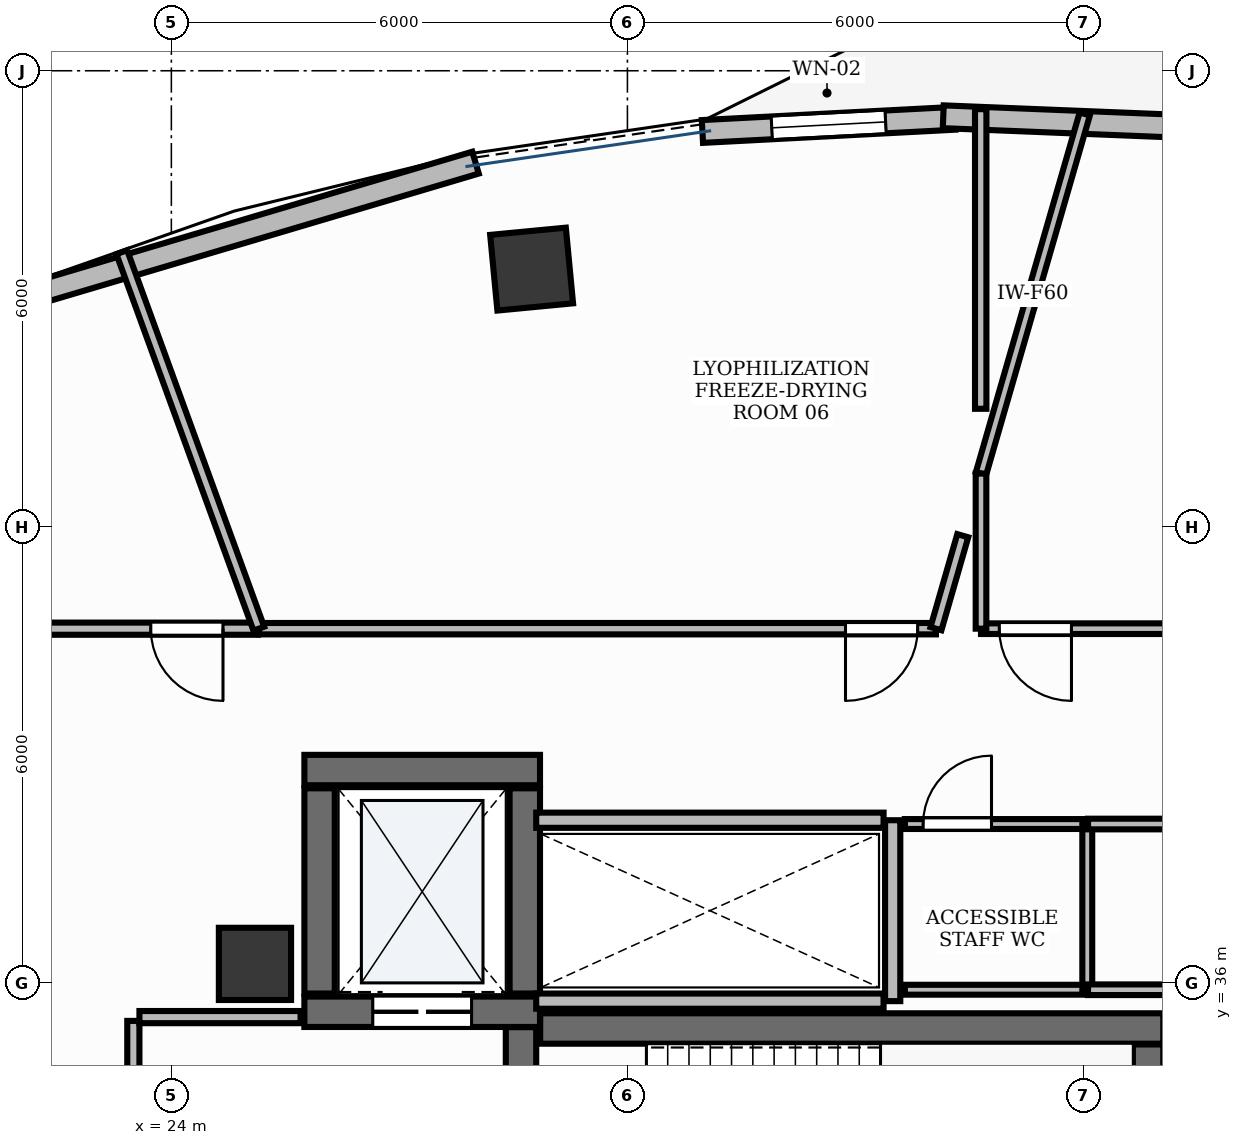
"""IFC4 building model, lengths in metres.
Left out: names, types, materials, properties, quantities, classifications, styles, units other than length and angle.
Written with IfcOpenShell. Run it as: python <this file> out.ifc"""

import sys

from ifc_helpers import new_model, si_unit, direction, frame, frame_2d, origin, origin_2d, place, context, subcontext, project, spatial, rectangle, extrude, element, fill, save


model = new_model("IFC4")
c1 = context("Model", 3, precision=1e-05, world=origin(), true_north=direction((0.0, 1.0)))
c2 = subcontext(c1, "Body", "Model", "MODEL_VIEW")
j1 = project(units=[si_unit("LENGTHUNIT", "METRE"), si_unit("PLANEANGLEUNIT", "RADIAN")], contexts=[c1])
p1 = place(None, origin())
s1 = spatial("IfcSite", under=j1, at=p1, CompositionType="ELEMENT")
p2 = place(p1, origin())
s2 = spatial("IfcBuilding", under=s1, at=p2, CompositionType="ELEMENT")
p3 = place(p2, frame((0.0, 0.0, 166.8)))
s3 = spatial("IfcBuildingStorey", under=s2, at=p3, CompositionType="ELEMENT", Elevation=166.8)
p4 = place(p3, frame((28.852, 35.4, 0.0), z_axis=(0.0, 0.0, 1.0), x_axis=(1.0, 0.0, 0.0)))
e1 = element("IfcWall", 1, at=p4, inside=s3, PredefinedType="SHEAR", context=c2, shape_type="SweptSolid", body=[
    extrude(rectangle(XDim=8.198, YDim=0.4, at=frame_2d((4.099, 0.0))), origin(), (0.0, 0.0, 1.0), 3.9),
])
p5 = place(p3, frame((36.85, 32.11, 0.0), z_axis=(0.0, 0.0, 1.0), x_axis=(0.0, 1.0, 0.0)))
e2 = element("IfcWall", 2, at=p5, inside=s3, PredefinedType="SHEAR", context=c2, shape_type="SweptSolid", body=[
    extrude(rectangle(XDim=3.08, YDim=0.4, at=frame_2d((1.54, 0.0))), origin(), (0.0, 0.0, 1.0), 3.9),
])
p6 = place(p3, frame((28.6, 32.11, 0.0), z_axis=(0.0, 0.0, 1.0), x_axis=(0.0, 1.0, 0.0)))
e3 = element("IfcWall", 3, at=p6, inside=s3, PredefinedType="SHEAR", context=c2, shape_type="SweptSolid", body=[
    extrude(rectangle(XDim=3.308, YDim=0.4, at=frame_2d((1.654, 0.0))), origin(), (0.0, 0.0, 1.0), 3.9),
])
p7 = place(p6, frame((0.2, 0.0, 0.0)))
e4 = element("IfcOpeningElement", 4, at=p7, cuts=e3, PredefinedType="OPENING", context=c2, shape_type="SweptSolid", body=[
    extrude(rectangle(XDim=1.05, YDim=2.15, at=frame_2d((0.525, 1.075))), frame((0.0, 0.215, 0.0), z_axis=(0.0, -1.0, 0.0), x_axis=(1.0, 0.0, 0.0)), (0.0, 0.0, 1.0), 0.43),
])
p8 = place(p3, frame((25.75, 38.8, 0.0), z_axis=(0.0, 0.0, 1.0), x_axis=(1.0, 0.0, 0.0)))
e5 = element("IfcWall", 5, at=p8, inside=s3, PredefinedType="SHEAR", context=c2, shape_type="SweptSolid", body=[
    extrude(rectangle(XDim=3.1, YDim=0.4, at=frame_2d((1.55, 0.0))), origin(), (0.0, 0.0, 1.0), 3.9),
])
p9 = place(p3, frame((25.75, 35.62, 0.0), z_axis=(0.0, 0.0, 1.0), x_axis=(1.0, 0.0, 0.0)))
e6 = element("IfcWall", 6, at=p9, inside=s3, PredefinedType="SHEAR", context=c2, shape_type="SweptSolid", body=[
    extrude(rectangle(XDim=3.1, YDim=0.4, at=frame_2d((1.55, 0.0))), origin(), (0.0, 0.0, 1.0), 3.9),
])
p10 = place(p9, frame((0.9, 0.0, 0.0)))
e7 = element("IfcOpeningElement", 7, at=p10, cuts=e6, PredefinedType="OPENING", context=c2, shape_type="SweptSolid", body=[
    extrude(rectangle(XDim=1.3, YDim=2.2, at=frame_2d((0.65, 1.1))), frame((0.0, 0.215, 0.0), z_axis=(0.0, -1.0, 0.0), x_axis=(1.0, 0.0, 0.0)), (0.0, 0.0, 1.0), 0.43),
])
for number, where, z_axis, x_axis in (
    (8, (25.95, 35.86, 0.0), (0.0, 0.0, 1.0), (0.0, 1.0, 0.0)),
    (9, (28.65, 35.86, 0.0), (0.0, 0.0, 1.0), (0.0, 1.0, 0.0)),
):
    element("IfcWall", number, at=place(p3, frame(where, z_axis=z_axis, x_axis=x_axis)), inside=s3, PredefinedType="SHEAR", context=c2, shape_type="SweptSolid", body=[
        extrude(rectangle(XDim=2.7, YDim=0.4, at=frame_2d((1.35, 0.0))), origin(), (0.0, 0.0, 1.0), 3.9),
    ])
p11 = place(p3, frame((25.1, 36.25, -0.0), z_axis=(0.0, 0.0, 1.0), x_axis=(1.0, 0.0, 0.0)))
e10 = element("IfcColumn", 10, at=p11, inside=s3, PredefinedType="PILASTER", context=c2, shape_type="SweptSolid", body=[
    extrude(rectangle(XDim=0.95, YDim=0.95, at=origin_2d()), origin(), (0.0, 0.0, 1.0), 3.901),
])
p12 = place(p3, frame((28.74, 45.39, -0.0), z_axis=(0.0, 0.0, 1.0), x_axis=(0.995462868748, 0.095150811579, 0.0)))
e11 = element("IfcColumn", 11, at=p12, inside=s3, PredefinedType="COLUMN", context=c2, shape_type="SweptSolid", body=[
    extrude(rectangle(XDim=1.0, YDim=1.0, at=origin_2d()), origin(), (0.0, 0.0, 1.0), 3.901),
])
p13 = place(p3, frame((34.309, 47.375, 0.0), z_axis=(0.0, 0.0, 1.0), x_axis=(-0.998637826203, -0.05217750547, 0.0)))
e12 = element("IfcWall", 12, at=p13, inside=s3, PredefinedType="STANDARD", context=c2, shape_type="SweptSolid", body=[
    extrude(rectangle(XDim=3.327, YDim=0.3, at=frame_2d((1.664, 0.0))), origin(), (0.0, 0.0, 1.0), 3.9),
])
p14 = place(p13, frame((0.913, 0.0, 0.95)))
e13 = element("IfcOpeningElement", 13, at=p14, cuts=e12, PredefinedType="OPENING", context=c2, shape_type="SweptSolid", body=[
    extrude(rectangle(XDim=1.5, YDim=1.8, at=frame_2d((0.75, 0.9))), frame((0.0, 0.165, 0.0), z_axis=(0.0, -1.0, 0.0), x_axis=(1.0, 0.0, 0.0)), (0.0, 0.0, 1.0), 0.33),
])
p15 = place(p3, frame((37.521, 47.259, 0.0), z_axis=(0.0, 0.0, 1.0), x_axis=(-0.999190386434, 0.040231475948, 0.0)))
e14 = element("IfcWall", 14, at=p15, inside=s3, PredefinedType="STANDARD", context=c2, shape_type="SweptSolid", body=[
    extrude(rectangle(XDim=3.368, YDim=0.3, at=frame_2d((1.684, 0.0))), origin(), (0.0, 0.0, 1.0), 3.9),
])
p16 = place(p3, frame((28.002, 46.791, 0.0), z_axis=(0.0, 0.0, 1.0), x_axis=(-0.958672086524, -0.284513322218, 0.0)))
e15 = element("IfcWall", 15, at=p16, inside=s3, PredefinedType="STANDARD", context=c2, shape_type="SweptSolid", body=[
    extrude(rectangle(XDim=6.396, YDim=0.3, at=frame_2d((3.198, 0.0))), origin(), (0.0, 0.0, 1.0), 3.47),
])
p17 = place(p3, frame((33.49, 35.76, 0.0), z_axis=(0.0, 0.0, 1.0), x_axis=(0.0, 1.0, 0.0)))
e16 = element("IfcWall", 16, at=p17, inside=s3, PredefinedType="PARTITIONING", context=c2, shape_type="SweptSolid", body=[
    extrude(rectangle(XDim=2.38, YDim=0.2, at=frame_2d((1.19, 0.0))), origin(), (0.0, 0.0, 1.0), 2.91),
])
for number, where, z_axis, x_axis in (
    (17, (28.8, 35.76, 0.0), (0.0, 0.0, 1.0), (1.0, 0.0, 0.0)),
    (18, (28.8, 38.14, 0.0), (0.0, 0.0, 1.0), (1.0, 0.0, 0.0)),
):
    element("IfcWall", number, at=place(p3, frame(where, z_axis=z_axis, x_axis=x_axis)), inside=s3, PredefinedType="PARTITIONING", context=c2, shape_type="SweptSolid", body=[
        extrude(rectangle(XDim=4.57, YDim=0.2, at=frame_2d((2.285, 0.0))), origin(), (0.0, 0.0, 1.0), 2.91),
    ])
p18 = place(p3, frame((23.5, 32.1, 0.0), z_axis=(0.0, 0.0, 1.0), x_axis=(0.0, 1.0, 0.0)))
e19 = element("IfcWall", 19, at=p18, inside=s3, PredefinedType="PARTITIONING", context=c2, shape_type="SweptSolid", body=[
    extrude(rectangle(XDim=3.4, YDim=0.16, at=frame_2d((1.7, 0.0))), origin(), (0.0, 0.0, 1.0), 2.91),
])
p19 = place(p18, frame((1.175, 0.0, 0.0)))
e20 = element("IfcOpeningElement", 20, at=p19, cuts=e19, PredefinedType="OPENING", context=c2, shape_type="SweptSolid", body=[
    extrude(rectangle(XDim=1.05, YDim=2.15, at=frame_2d((0.525, 1.075))), frame((0.0, 0.095, 0.0), z_axis=(0.0, -1.0, 0.0), x_axis=(1.0, 0.0, 0.0)), (0.0, 0.0, 1.0), 0.19),
])
p20 = place(p3, frame((23.58, 35.55, 0.0), z_axis=(0.0, 0.0, 1.0), x_axis=(1.0, 0.0, 0.0)))
e21 = element("IfcWall", 21, at=p20, inside=s3, PredefinedType="PARTITIONING", context=c2, shape_type="SweptSolid", body=[
    extrude(rectangle(XDim=2.12, YDim=0.16, at=frame_2d((1.06, 0.0))), origin(), (0.0, 0.0, 1.0), 2.91),
])
p21 = place(p3, frame((33.65, 38.09, 0.0), z_axis=(0.0, 0.0, 1.0), x_axis=(1.0, 0.0, 0.0)))
e22 = element("IfcWall", 22, at=p21, inside=s3, PredefinedType="PARTITIONING", context=c2, shape_type="SweptSolid", body=[
    extrude(rectangle(XDim=2.4, YDim=0.13, at=frame_2d((1.2, 0.0))), origin(), (0.0, 0.0, 1.0), 2.91),
])
p22 = place(p21, frame((0.24, 0.0, 0.0)))
e23 = element("IfcOpeningElement", 23, at=p22, cuts=e22, PredefinedType="OPENING", context=c2, shape_type="SweptSolid", body=[
    extrude(rectangle(XDim=0.9, YDim=2.15, at=frame_2d((0.45, 1.075))), frame((0.0, 0.08, 0.0), z_axis=(0.0, -1.0, 0.0), x_axis=(1.0, 0.0, 0.0)), (0.0, 0.0, 1.0), 0.16),
])
p23 = place(p3, frame((37.2, 40.66, 0.0), z_axis=(0.0, 0.0, 1.0), x_axis=(-1.0, 0.0, 0.0)))
e24 = element("IfcWall", 24, at=p23, inside=s3, PredefinedType="PARTITIONING", context=c2, shape_type="SweptSolid", body=[
    extrude(rectangle(XDim=2.548, YDim=0.14, at=frame_2d((1.274, 0.0))), origin(), (0.0, 0.0, 1.0), 2.91),
])
p24 = place(p23, frame((1.358, 0.0, 0.0)))
e25 = element("IfcOpeningElement", 25, at=p24, cuts=e24, PredefinedType="OPENING", context=c2, shape_type="SweptSolid", body=[
    extrude(rectangle(XDim=0.95, YDim=2.15, at=frame_2d((0.475, 1.075))), frame((0.0, 0.085, 0.0), z_axis=(0.0, -1.0, 0.0), x_axis=(1.0, 0.0, 0.0)), (0.0, 0.0, 1.0), 0.17),
])
p25 = place(p3, frame((34.059, 40.66, 0.0), z_axis=(0.0, 0.0, 1.0), x_axis=(-1.0, 0.0, 0.0)))
e26 = element("IfcWall", 26, at=p25, inside=s3, PredefinedType="PARTITIONING", context=c2, shape_type="SweptSolid", body=[
    extrude(rectangle(XDim=8.908, YDim=0.15, at=frame_2d((4.454, 0.0))), origin(), (0.0, 0.0, 1.0), 2.91),
])
p26 = place(p25, frame((0.24, 0.0, 0.0)))
e27 = element("IfcOpeningElement", 27, at=p26, cuts=e26, PredefinedType="OPENING", context=c2, shape_type="SweptSolid", body=[
    extrude(rectangle(XDim=0.95, YDim=2.15, at=frame_2d((0.475, 1.075))), frame((0.0, 0.09, 0.0), z_axis=(0.0, -1.0, 0.0), x_axis=(1.0, 0.0, 0.0)), (0.0, 0.0, 1.0), 0.18),
])
p27 = place(p3, frame((25.14, 40.66, 0.0), z_axis=(0.0, 0.0, 1.0), x_axis=(-1.0, 0.0, 0.0)))
e28 = element("IfcWall", 28, at=p27, inside=s3, PredefinedType="PARTITIONING", context=c2, shape_type="SweptSolid", body=[
    extrude(rectangle(XDim=3.39, YDim=0.16, at=frame_2d((1.695, 0.0))), origin(), (0.0, 0.0, 1.0), 2.91),
])
p28 = place(p27, frame((0.461, 0.0, 0.0)))
e29 = element("IfcOpeningElement", 29, at=p28, cuts=e28, PredefinedType="OPENING", context=c2, shape_type="SweptSolid", body=[
    extrude(rectangle(XDim=0.95, YDim=2.15, at=frame_2d((0.475, 1.075))), frame((0.0, 0.095, 0.0), z_axis=(0.0, -1.0, 0.0), x_axis=(1.0, 0.0, 0.0)), (0.0, 0.0, 1.0), 0.19),
])
p29 = place(p3, frame((36.05, 35.91, 0.0), z_axis=(0.0, 0.0, 1.0), x_axis=(-1.0, 0.0, 0.0)))
e30 = element("IfcWall", 30, at=p29, inside=s3, PredefinedType="PARTITIONING", context=c2, shape_type="SweptSolid", body=[
    extrude(rectangle(XDim=2.4, YDim=0.13, at=frame_2d((1.2, 0.0))), origin(), (0.0, 0.0, 1.0), 2.91),
])
p30 = place(p3, frame((36.05, 38.09, 0.0), z_axis=(0.0, 0.0, 1.0), x_axis=(0.0, -1.0, 0.0)))
e31 = element("IfcWall", 31, at=p30, inside=s3, PredefinedType="PARTITIONING", context=c2, shape_type="SweptSolid", body=[
    extrude(rectangle(XDim=2.18, YDim=0.13, at=frame_2d((1.09, 0.0))), origin(), (0.0, 0.0, 1.0), 2.91),
])
p31 = place(p3, frame((34.652, 42.701, 0.0), z_axis=(0.0, 0.0, 1.0), x_axis=(0.277202021351, 0.960811656548, 0.0)))
e32 = element("IfcWall", 32, at=p31, inside=s3, PredefinedType="PARTITIONING", context=c2, shape_type="SweptSolid", body=[
    extrude(rectangle(XDim=4.924, YDim=0.14, at=frame_2d((2.462, 0.0))), origin(), (0.0, 0.0, 1.0), 2.91),
])
p32 = place(p3, frame((37.35, 35.91, 0.0), z_axis=(0.0, 0.0, 1.0), x_axis=(-1.0, 0.0, 0.0)))
e33 = element("IfcWall", 33, at=p32, inside=s3, PredefinedType="PARTITIONING", context=c2, shape_type="SweptSolid", body=[
    extrude(rectangle(XDim=1.29, YDim=0.14, at=frame_2d((0.645, 0.0))), origin(), (0.0, 0.0, 1.0), 2.91),
])
p33 = place(p3, frame((36.06, 38.09, 0.0), z_axis=(0.0, 0.0, 1.0), x_axis=(1.0, 0.0, 0.0)))
e34 = element("IfcWall", 34, at=p33, inside=s3, PredefinedType="PARTITIONING", context=c2, shape_type="SweptSolid", body=[
    extrude(rectangle(XDim=1.14, YDim=0.14, at=frame_2d((0.57, 0.0))), origin(), (0.0, 0.0, 1.0), 2.91),
])
p34 = place(p3, frame((34.652, 40.66, 0.0), z_axis=(0.0, 0.0, 1.0), x_axis=(0.0, 1.0, 0.0)))
e35 = element("IfcWall", 35, at=p34, inside=s3, PredefinedType="PARTITIONING", context=c2, shape_type="SweptSolid", body=[
    extrude(rectangle(XDim=2.041, YDim=0.14, at=frame_2d((1.021, 0.0))), origin(), (0.0, 0.0, 1.0), 2.91),
])
p35 = place(p3, frame((34.648, 47.495, 0.0), z_axis=(0.0, 0.0, 1.0), x_axis=(0.0, -1.0, 0.0)))
e36 = element("IfcWall", 36, at=p35, inside=s3, PredefinedType="PARTITIONING", context=c2, shape_type="SweptSolid", body=[
    extrude(rectangle(XDim=3.942, YDim=0.15, at=frame_2d((1.971, 0.0))), origin(), (0.0, 0.0, 1.0), 2.91),
])
p36 = place(p3, frame((34.412, 41.883, 0.0), z_axis=(0.0, 0.0, 1.0), x_axis=(-0.277252558392, -0.960797074759, 0.0)))
e37 = element("IfcWall", 37, at=p36, inside=s3, PredefinedType="PARTITIONING", context=c2, shape_type="SweptSolid", body=[
    extrude(rectangle(XDim=1.273, YDim=0.15, at=frame_2d((0.637, 0.0))), origin(), (0.0, 0.0, 1.0), 2.91),
])
p37 = place(p3, frame((25.151, 40.66, 0.0), z_axis=(0.0, 0.0, 1.0), x_axis=(-0.341995928267, 0.939701433993, 0.0)))
e38 = element("IfcWall", 38, at=p37, inside=s3, PredefinedType="PARTITIONING", context=c2, shape_type="SweptSolid", body=[
    extrude(rectangle(XDim=5.271, YDim=0.15, at=frame_2d((2.636, 0.0))), origin(), (0.0, 0.0, 1.0), 2.91),
])
p38 = place(p14, origin())
e39 = element("IfcWindow", 39, at=p38, inside=s3, PartitioningType="DOUBLE_PANEL_VERTICAL", PredefinedType="WINDOW", context=c2, shape_type="SweptSolid", body=[
    extrude(rectangle(XDim=1.5, YDim=1.8, at=frame_2d((0.75, 0.9))), frame((0.0, 0.03, 0.0), z_axis=(0.0, -1.0, 0.0), x_axis=(1.0, 0.0, 0.0)), (0.0, 0.0, 1.0), 0.06),
])
fill(e13, e39)
p39 = place(p10, origin())
e40 = element("IfcDoor", 40, at=p39, inside=s3, OperationType="DOUBLE_DOOR_SLIDING", PredefinedType="DOOR", context=c2, shape_type="SweptSolid", body=[
    extrude(rectangle(XDim=1.3, YDim=2.2, at=frame_2d((0.65, 1.1))), frame((0.0, 0.025, 0.0), z_axis=(0.0, -1.0, 0.0), x_axis=(1.0, 0.0, 0.0)), (0.0, 0.0, 1.0), 0.05),
])
fill(e7, e40)
p40 = place(p22, origin())
e41 = element("IfcDoor", 41, at=p40, inside=s3, OperationType="SINGLE_SWING_RIGHT", PredefinedType="DOOR", context=c2, shape_type="SweptSolid", body=[
    extrude(rectangle(XDim=0.9, YDim=2.15, at=frame_2d((0.45, 1.075))), frame((0.0, 0.025, 0.0), z_axis=(0.0, -1.0, 0.0), x_axis=(1.0, 0.0, 0.0)), (0.0, 0.0, 1.0), 0.05),
])
fill(e23, e41)
p41 = place(p24, origin())
e42 = element("IfcDoor", 42, at=p41, inside=s3, OperationType="SINGLE_SWING_LEFT", PredefinedType="DOOR", context=c2, shape_type="SweptSolid", body=[
    extrude(rectangle(XDim=0.95, YDim=2.15, at=frame_2d((0.475, 1.075))), frame((0.0, 0.025, 0.0), z_axis=(0.0, -1.0, 0.0), x_axis=(1.0, 0.0, 0.0)), (0.0, 0.0, 1.0), 0.05),
])
fill(e25, e42)
p42 = place(p26, origin())
e43 = element("IfcDoor", 43, at=p42, inside=s3, OperationType="SINGLE_SWING_RIGHT", PredefinedType="DOOR", context=c2, shape_type="SweptSolid", body=[
    extrude(rectangle(XDim=0.95, YDim=2.15, at=frame_2d((0.475, 1.075))), frame((0.0, 0.025, 0.0), z_axis=(0.0, -1.0, 0.0), x_axis=(1.0, 0.0, 0.0)), (0.0, 0.0, 1.0), 0.05),
])
fill(e27, e43)
p43 = place(p28, origin())
e44 = element("IfcDoor", 44, at=p43, inside=s3, OperationType="SINGLE_SWING_LEFT", PredefinedType="DOOR", context=c2, shape_type="SweptSolid", body=[
    extrude(rectangle(XDim=0.95, YDim=2.15, at=frame_2d((0.475, 1.075))), frame((0.0, 0.025, 0.0), z_axis=(0.0, -1.0, 0.0), x_axis=(1.0, 0.0, 0.0)), (0.0, 0.0, 1.0), 0.05),
])
fill(e29, e44)
save(model, sys.argv[1])
